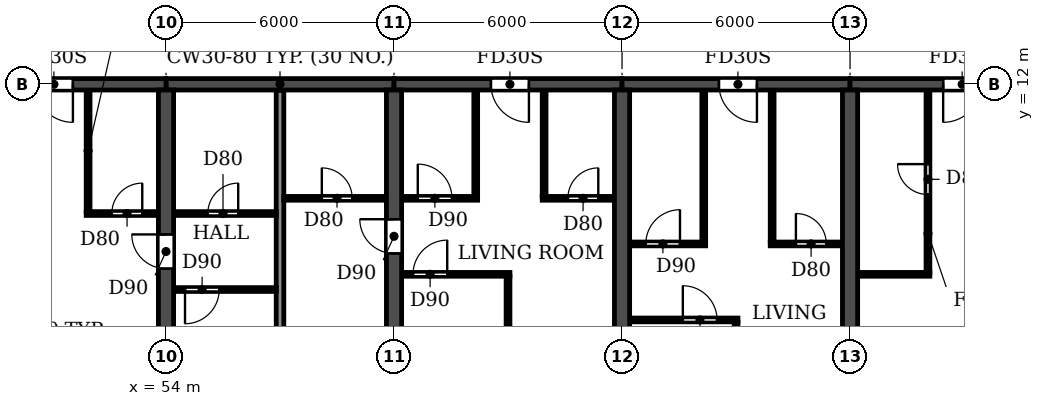
"""IFC4 building model, lengths in metres.
Left out: names, types, materials, properties, quantities, classifications, styles, units other than length and angle.
Written with IfcOpenShell. Run it as: python <this file> out.ifc"""

import sys

from ifc_helpers import new_model, si_unit, direction, frame, frame_2d, origin, place, context, subcontext, project, spatial, rectangle, extrude, element, fill, save


model = new_model("IFC4")
c1 = context("Model", 3, precision=1e-05, world=origin(), true_north=direction((0.0, 1.0)))
c2 = subcontext(c1, "Body", "Model", "MODEL_VIEW")
j1 = project(units=[si_unit("LENGTHUNIT", "METRE"), si_unit("PLANEANGLEUNIT", "RADIAN")], contexts=[c1])
p1 = place(None, origin())
s1 = spatial("IfcSite", under=j1, at=p1, CompositionType="ELEMENT")
p2 = place(p1, origin())
s2 = spatial("IfcBuilding", under=s1, at=p2, CompositionType="ELEMENT")
p3 = place(p2, frame((0.0, 0.0, 33.3)))
s3 = spatial("IfcBuildingStorey", under=s2, at=p3, CompositionType="ELEMENT", Elevation=33.3)
p4 = place(p3, frame((54.0, 0.2, 0.0), z_axis=(0.0, 0.0, 1.0), x_axis=(0.0, 1.0, 0.0)))
e1 = element("IfcWall", 1, at=p4, inside=s3, PredefinedType="SHEAR", context=c2, shape_type="SweptSolid", body=[
    extrude(rectangle(XDim=11.65, YDim=0.4, at=frame_2d((5.825, 0.0))), origin(), (0.0, 0.0, 1.0), 3.05),
])
p5 = place(p4, frame((6.95, 0.0, 0.0)))
e2 = element("IfcOpeningElement", 2, at=p5, cuts=e1, PredefinedType="OPENING", context=c2, shape_type="SweptSolid", body=[
    extrude(rectangle(XDim=0.9, YDim=2.1, at=frame_2d((0.45, 1.05))), frame((0.0, 0.21, 0.0), z_axis=(0.0, -1.0, 0.0), x_axis=(1.0, 0.0, 0.0)), (0.0, 0.0, 1.0), 0.42),
])
p6 = place(p3, frame((60.0, 0.2, 0.0), z_axis=(0.0, 0.0, 1.0), x_axis=(0.0, 1.0, 0.0)))
e3 = element("IfcWall", 3, at=p6, inside=s3, PredefinedType="SHEAR", context=c2, shape_type="SweptSolid", body=[
    extrude(rectangle(XDim=11.65, YDim=0.4, at=frame_2d((5.825, 0.0))), origin(), (0.0, 0.0, 1.0), 3.05),
])
p7 = place(p6, frame((7.35, 0.0, 0.0)))
e4 = element("IfcOpeningElement", 4, at=p7, cuts=e3, PredefinedType="OPENING", context=c2, shape_type="SweptSolid", body=[
    extrude(rectangle(XDim=0.9, YDim=2.1, at=frame_2d((0.45, 1.05))), frame((0.0, 0.21, 0.0), z_axis=(0.0, -1.0, 0.0), x_axis=(1.0, 0.0, 0.0)), (0.0, 0.0, 1.0), 0.42),
])
for number, where, z_axis, x_axis in (
    (5, (66.0, 0.2, 0.0), (0.0, 0.0, 1.0), (0.0, 1.0, 0.0)),
    (6, (72.0, 0.2, 0.0), (0.0, 0.0, 1.0), (0.0, 1.0, 0.0)),
):
    element("IfcWall", number, at=place(p3, frame(where, z_axis=z_axis, x_axis=x_axis)), inside=s3, PredefinedType="SHEAR", context=c2, shape_type="SweptSolid", body=[
        extrude(rectangle(XDim=11.65, YDim=0.4, at=frame_2d((5.825, 0.0))), origin(), (0.0, 0.0, 1.0), 3.05),
    ])
p8 = place(p3, frame((48.0, 12.0, 0.0), z_axis=(0.0, 0.0, 1.0), x_axis=(1.0, 0.0, 0.0)))
e7 = element("IfcWall", 7, at=p8, inside=s3, PredefinedType="SHEAR", context=c2, shape_type="SweptSolid", body=[
    extrude(rectangle(XDim=6.0, YDim=0.3, at=frame_2d((3.0, 0.0))), origin(), (0.0, 0.0, 1.0), 2.45),
])
p9 = place(p8, frame((2.55, 0.0, 0.0)))
e8 = element("IfcOpeningElement", 8, at=p9, cuts=e7, PredefinedType="OPENING", context=c2, shape_type="SweptSolid", body=[
    extrude(rectangle(XDim=1.0, YDim=2.1, at=frame_2d((0.5, 1.05))), frame((0.0, 0.16, 0.0), z_axis=(0.0, -1.0, 0.0), x_axis=(1.0, 0.0, 0.0)), (0.0, 0.0, 1.0), 0.32),
])
p10 = place(p3, frame((54.0, 12.0, 0.0), z_axis=(0.0, 0.0, 1.0), x_axis=(1.0, 0.0, 0.0)))
e9 = element("IfcWall", 9, at=p10, inside=s3, PredefinedType="SHEAR", context=c2, shape_type="SweptSolid", body=[
    extrude(rectangle(XDim=6.0, YDim=0.3, at=frame_2d((3.0, 0.0))), origin(), (0.0, 0.0, 1.0), 2.45),
])
p11 = place(p3, frame((60.0, 12.0, 0.0), z_axis=(0.0, 0.0, 1.0), x_axis=(1.0, 0.0, 0.0)))
e10 = element("IfcWall", 10, at=p11, inside=s3, PredefinedType="SHEAR", context=c2, shape_type="SweptSolid", body=[
    extrude(rectangle(XDim=6.0, YDim=0.3, at=frame_2d((3.0, 0.0))), origin(), (0.0, 0.0, 1.0), 2.45),
])
p12 = place(p11, frame((2.55, 0.0, 0.0)))
e11 = element("IfcOpeningElement", 11, at=p12, cuts=e10, PredefinedType="OPENING", context=c2, shape_type="SweptSolid", body=[
    extrude(rectangle(XDim=1.0, YDim=2.1, at=frame_2d((0.5, 1.05))), frame((0.0, 0.16, 0.0), z_axis=(0.0, -1.0, 0.0), x_axis=(1.0, 0.0, 0.0)), (0.0, 0.0, 1.0), 0.32),
])
p13 = place(p3, frame((66.0, 12.0, 0.0), z_axis=(0.0, 0.0, 1.0), x_axis=(1.0, 0.0, 0.0)))
e12 = element("IfcWall", 12, at=p13, inside=s3, PredefinedType="SHEAR", context=c2, shape_type="SweptSolid", body=[
    extrude(rectangle(XDim=6.0, YDim=0.3, at=frame_2d((3.0, 0.0))), origin(), (0.0, 0.0, 1.0), 2.45),
])
p14 = place(p13, frame((2.55, 0.0, 0.0)))
e13 = element("IfcOpeningElement", 13, at=p14, cuts=e12, PredefinedType="OPENING", context=c2, shape_type="SweptSolid", body=[
    extrude(rectangle(XDim=1.0, YDim=2.1, at=frame_2d((0.5, 1.05))), frame((0.0, 0.16, 0.0), z_axis=(0.0, -1.0, 0.0), x_axis=(1.0, 0.0, 0.0)), (0.0, 0.0, 1.0), 0.32),
])
p15 = place(p3, frame((72.0, 12.0, 0.0), z_axis=(0.0, 0.0, 1.0), x_axis=(1.0, 0.0, 0.0)))
e14 = element("IfcWall", 14, at=p15, inside=s3, PredefinedType="SHEAR", context=c2, shape_type="SweptSolid", body=[
    extrude(rectangle(XDim=6.0, YDim=0.3, at=frame_2d((3.0, 0.0))), origin(), (0.0, 0.0, 1.0), 2.45),
])
p16 = place(p15, frame((2.45, 0.0, 0.0)))
e15 = element("IfcOpeningElement", 15, at=p16, cuts=e14, PredefinedType="OPENING", context=c2, shape_type="SweptSolid", body=[
    extrude(rectangle(XDim=1.0, YDim=2.1, at=frame_2d((0.5, 1.05))), frame((0.0, 0.16, 0.0), z_axis=(0.0, -1.0, 0.0), x_axis=(1.0, 0.0, 0.0)), (0.0, 0.0, 1.0), 0.32),
])
p17 = place(p3, frame((57.0, 0.06, 0.0), z_axis=(0.0, 0.0, 1.0), x_axis=(0.0, 1.0, 0.0)))
e16 = element("IfcWall", 16, at=p17, inside=s3, PredefinedType="PARTITIONING", context=c2, shape_type="SweptSolid", body=[
    extrude(rectangle(XDim=11.78, YDim=0.2, at=frame_2d((5.89, 0.0))), origin(), (0.0, 0.0, 1.0), 3.05),
])
p18 = place(p3, frame((66.21, 5.8, 0.0), z_axis=(0.0, 0.0, 1.0), x_axis=(1.0, 0.0, 0.0)))
e17 = element("IfcWall", 17, at=p18, inside=s3, PredefinedType="PARTITIONING", context=c2, shape_type="SweptSolid", body=[
    extrude(rectangle(XDim=2.84, YDim=0.1, at=frame_2d((1.42, 0.0))), origin(), (0.0, 0.0, 1.0), 3.05),
])
p19 = place(p18, frame((1.39, 0.0, 0.0)))
e18 = element("IfcOpeningElement", 18, at=p19, cuts=e17, PredefinedType="OPENING", context=c2, shape_type="SweptSolid", body=[
    extrude(rectangle(XDim=0.9, YDim=2.1, at=frame_2d((0.45, 1.05))), frame((0.0, 0.06, 0.0), z_axis=(0.0, -1.0, 0.0), x_axis=(1.0, 0.0, 0.0)), (0.0, 0.0, 1.0), 0.12),
])
p20 = place(p3, frame((54.21, 6.6, 0.0), z_axis=(0.0, 0.0, 1.0), x_axis=(1.0, 0.0, 0.0)))
e19 = element("IfcWall", 19, at=p20, inside=s3, PredefinedType="PARTITIONING", context=c2, shape_type="SweptSolid", body=[
    extrude(rectangle(XDim=2.69, YDim=0.1, at=frame_2d((1.345, 0.0))), origin(), (0.0, 0.0, 1.0), 3.05),
])
p21 = place(p20, frame((0.29, 0.0, 0.0)))
e20 = element("IfcOpeningElement", 20, at=p21, cuts=e19, PredefinedType="OPENING", context=c2, shape_type="SweptSolid", body=[
    extrude(rectangle(XDim=0.9, YDim=2.1, at=frame_2d((0.45, 1.05))), frame((0.0, 0.06, 0.0), z_axis=(0.0, -1.0, 0.0), x_axis=(1.0, 0.0, 0.0)), (0.0, 0.0, 1.0), 0.12),
])
p22 = place(p3, frame((60.21, 7.0, 0.0), z_axis=(0.0, 0.0, 1.0), x_axis=(1.0, 0.0, 0.0)))
e21 = element("IfcWall", 21, at=p22, inside=s3, PredefinedType="PARTITIONING", context=c2, shape_type="SweptSolid", body=[
    extrude(rectangle(XDim=2.84, YDim=0.1, at=frame_2d((1.42, 0.0))), origin(), (0.0, 0.0, 1.0), 3.05),
])
p23 = place(p22, frame((0.29, 0.0, 0.0)))
e22 = element("IfcOpeningElement", 22, at=p23, cuts=e21, PredefinedType="OPENING", context=c2, shape_type="SweptSolid", body=[
    extrude(rectangle(XDim=0.9, YDim=2.1, at=frame_2d((0.45, 1.05))), frame((0.0, 0.06, 0.0), z_axis=(0.0, -1.0, 0.0), x_axis=(1.0, 0.0, 0.0)), (0.0, 0.0, 1.0), 0.12),
])
p24 = place(p3, frame((72.21, 7.0, 0.0), z_axis=(0.0, 0.0, 1.0), x_axis=(1.0, 0.0, 0.0)))
e23 = element("IfcWall", 23, at=p24, inside=s3, PredefinedType="PARTITIONING", context=c2, shape_type="SweptSolid", body=[
    extrude(rectangle(XDim=1.89, YDim=0.1, at=frame_2d((0.945, 0.0))), origin(), (0.0, 0.0, 1.0), 3.05),
])
p25 = place(p3, frame((66.21, 7.8, 0.0), z_axis=(0.0, 0.0, 1.0), x_axis=(1.0, 0.0, 0.0)))
e24 = element("IfcWall", 24, at=p25, inside=s3, PredefinedType="PARTITIONING", context=c2, shape_type="SweptSolid", body=[
    extrude(rectangle(XDim=1.99, YDim=0.1, at=frame_2d((0.995, 0.0))), origin(), (0.0, 0.0, 1.0), 3.05),
])
p26 = place(p25, frame((0.415, 0.0, 0.0)))
e25 = element("IfcOpeningElement", 25, at=p26, cuts=e24, PredefinedType="OPENING", context=c2, shape_type="SweptSolid", body=[
    extrude(rectangle(XDim=0.9, YDim=2.1, at=frame_2d((0.45, 1.05))), frame((0.0, 0.06, 0.0), z_axis=(0.0, -1.0, 0.0), x_axis=(1.0, 0.0, 0.0)), (0.0, 0.0, 1.0), 0.12),
])
p27 = place(p3, frame((69.9, 7.8, 0.0), z_axis=(0.0, 0.0, 1.0), x_axis=(1.0, 0.0, 0.0)))
e26 = element("IfcWall", 26, at=p27, inside=s3, PredefinedType="PARTITIONING", context=c2, shape_type="SweptSolid", body=[
    extrude(rectangle(XDim=1.89, YDim=0.1, at=frame_2d((0.945, 0.0))), origin(), (0.0, 0.0, 1.0), 3.05),
])
p28 = place(p27, frame((0.675, 0.0, 0.0)))
e27 = element("IfcOpeningElement", 27, at=p28, cuts=e26, PredefinedType="OPENING", context=c2, shape_type="SweptSolid", body=[
    extrude(rectangle(XDim=0.8, YDim=2.1, at=frame_2d((0.4, 1.05))), frame((0.0, 0.06, 0.0), z_axis=(0.0, -1.0, 0.0), x_axis=(1.0, 0.0, 0.0)), (0.0, 0.0, 1.0), 0.12),
])
p29 = place(p3, frame((51.9, 8.6, 0.0), z_axis=(0.0, 0.0, 1.0), x_axis=(1.0, 0.0, 0.0)))
e28 = element("IfcWall", 28, at=p29, inside=s3, PredefinedType="PARTITIONING", context=c2, shape_type="SweptSolid", body=[
    extrude(rectangle(XDim=1.89, YDim=0.1, at=frame_2d((0.945, 0.0))), origin(), (0.0, 0.0, 1.0), 3.05),
])
p30 = place(p29, frame((0.675, 0.0, 0.0)))
e29 = element("IfcOpeningElement", 29, at=p30, cuts=e28, PredefinedType="OPENING", context=c2, shape_type="SweptSolid", body=[
    extrude(rectangle(XDim=0.8, YDim=2.1, at=frame_2d((0.4, 1.05))), frame((0.0, 0.06, 0.0), z_axis=(0.0, -1.0, 0.0), x_axis=(1.0, 0.0, 0.0)), (0.0, 0.0, 1.0), 0.12),
])
p31 = place(p3, frame((54.21, 8.6, 0.0), z_axis=(0.0, 0.0, 1.0), x_axis=(1.0, 0.0, 0.0)))
e30 = element("IfcWall", 30, at=p31, inside=s3, PredefinedType="PARTITIONING", context=c2, shape_type="SweptSolid", body=[
    extrude(rectangle(XDim=2.69, YDim=0.1, at=frame_2d((1.345, 0.0))), origin(), (0.0, 0.0, 1.0), 3.05),
])
p32 = place(p31, frame((0.89, 0.0, 0.0)))
e31 = element("IfcOpeningElement", 31, at=p32, cuts=e30, PredefinedType="OPENING", context=c2, shape_type="SweptSolid", body=[
    extrude(rectangle(XDim=0.8, YDim=2.1, at=frame_2d((0.4, 1.05))), frame((0.0, 0.06, 0.0), z_axis=(0.0, -1.0, 0.0), x_axis=(1.0, 0.0, 0.0)), (0.0, 0.0, 1.0), 0.12),
])
p33 = place(p3, frame((57.1, 9.0, 0.0), z_axis=(0.0, 0.0, 1.0), x_axis=(1.0, 0.0, 0.0)))
e32 = element("IfcWall", 32, at=p33, inside=s3, PredefinedType="PARTITIONING", context=c2, shape_type="SweptSolid", body=[
    extrude(rectangle(XDim=2.69, YDim=0.1, at=frame_2d((1.345, 0.0))), origin(), (0.0, 0.0, 1.0), 3.05),
])
p34 = place(p33, frame((1.0, 0.0, 0.0)))
e33 = element("IfcOpeningElement", 33, at=p34, cuts=e32, PredefinedType="OPENING", context=c2, shape_type="SweptSolid", body=[
    extrude(rectangle(XDim=0.8, YDim=2.1, at=frame_2d((0.4, 1.05))), frame((0.0, 0.06, 0.0), z_axis=(0.0, -1.0, 0.0), x_axis=(1.0, 0.0, 0.0)), (0.0, 0.0, 1.0), 0.12),
])
p35 = place(p3, frame((60.21, 9.0, 0.0), z_axis=(0.0, 0.0, 1.0), x_axis=(1.0, 0.0, 0.0)))
e34 = element("IfcWall", 34, at=p35, inside=s3, PredefinedType="PARTITIONING", context=c2, shape_type="SweptSolid", body=[
    extrude(rectangle(XDim=1.99, YDim=0.1, at=frame_2d((0.995, 0.0))), origin(), (0.0, 0.0, 1.0), 3.05),
])
p36 = place(p35, frame((0.415, 0.0, 0.0)))
e35 = element("IfcOpeningElement", 35, at=p36, cuts=e34, PredefinedType="OPENING", context=c2, shape_type="SweptSolid", body=[
    extrude(rectangle(XDim=0.9, YDim=2.1, at=frame_2d((0.45, 1.05))), frame((0.0, 0.06, 0.0), z_axis=(0.0, -1.0, 0.0), x_axis=(1.0, 0.0, 0.0)), (0.0, 0.0, 1.0), 0.12),
])
p37 = place(p3, frame((63.9, 9.0, 0.0), z_axis=(0.0, 0.0, 1.0), x_axis=(1.0, 0.0, 0.0)))
e36 = element("IfcWall", 36, at=p37, inside=s3, PredefinedType="PARTITIONING", context=c2, shape_type="SweptSolid", body=[
    extrude(rectangle(XDim=1.89, YDim=0.1, at=frame_2d((0.945, 0.0))), origin(), (0.0, 0.0, 1.0), 3.05),
])
p38 = place(p37, frame((0.675, 0.0, 0.0)))
e37 = element("IfcOpeningElement", 37, at=p38, cuts=e36, PredefinedType="OPENING", context=c2, shape_type="SweptSolid", body=[
    extrude(rectangle(XDim=0.8, YDim=2.1, at=frame_2d((0.4, 1.05))), frame((0.0, 0.06, 0.0), z_axis=(0.0, -1.0, 0.0), x_axis=(1.0, 0.0, 0.0)), (0.0, 0.0, 1.0), 0.12),
])
p39 = place(p3, frame((51.95, 8.65, 0.0), z_axis=(0.0, 0.0, 1.0), x_axis=(0.0, 1.0, 0.0)))
e38 = element("IfcWall", 38, at=p39, inside=s3, PredefinedType="PARTITIONING", context=c2, shape_type="SweptSolid", body=[
    extrude(rectangle(XDim=3.19, YDim=0.1, at=frame_2d((1.595, 0.0))), origin(), (0.0, 0.0, 1.0), 3.05),
])
p40 = place(p3, frame((62.15, 9.05, 0.0), z_axis=(0.0, 0.0, 1.0), x_axis=(0.0, 1.0, 0.0)))
e39 = element("IfcWall", 39, at=p40, inside=s3, PredefinedType="PARTITIONING", context=c2, shape_type="SweptSolid", body=[
    extrude(rectangle(XDim=2.79, YDim=0.1, at=frame_2d((1.395, 0.0))), origin(), (0.0, 0.0, 1.0), 3.05),
])
p41 = place(p3, frame((63.0, 0.06, 0.0), z_axis=(0.0, 0.0, 1.0), x_axis=(0.0, 1.0, 0.0)))
e40 = element("IfcWall", 40, at=p41, inside=s3, PredefinedType="PARTITIONING", context=c2, shape_type="SweptSolid", body=[
    extrude(rectangle(XDim=6.89, YDim=0.1, at=frame_2d((3.445, 0.0))), origin(), (0.0, 0.0, 1.0), 3.05),
])
p42 = place(p3, frame((63.95, 9.05, 0.0), z_axis=(0.0, 0.0, 1.0), x_axis=(0.0, 1.0, 0.0)))
e41 = element("IfcWall", 41, at=p42, inside=s3, PredefinedType="PARTITIONING", context=c2, shape_type="SweptSolid", body=[
    extrude(rectangle(XDim=2.79, YDim=0.1, at=frame_2d((1.395, 0.0))), origin(), (0.0, 0.0, 1.0), 3.05),
])
p43 = place(p3, frame((68.15, 7.85, 0.0), z_axis=(0.0, 0.0, 1.0), x_axis=(0.0, 1.0, 0.0)))
e42 = element("IfcWall", 42, at=p43, inside=s3, PredefinedType="PARTITIONING", context=c2, shape_type="SweptSolid", body=[
    extrude(rectangle(XDim=3.99, YDim=0.1, at=frame_2d((1.995, 0.0))), origin(), (0.0, 0.0, 1.0), 3.05),
])
p44 = place(p3, frame((69.0, 0.06, 0.0), z_axis=(0.0, 0.0, 1.0), x_axis=(0.0, 1.0, 0.0)))
e43 = element("IfcWall", 43, at=p44, inside=s3, PredefinedType="PARTITIONING", context=c2, shape_type="SweptSolid", body=[
    extrude(rectangle(XDim=5.69, YDim=0.1, at=frame_2d((2.845, 0.0))), origin(), (0.0, 0.0, 1.0), 3.05),
])
p45 = place(p3, frame((69.95, 7.85, 0.0), z_axis=(0.0, 0.0, 1.0), x_axis=(0.0, 1.0, 0.0)))
e44 = element("IfcWall", 44, at=p45, inside=s3, PredefinedType="PARTITIONING", context=c2, shape_type="SweptSolid", body=[
    extrude(rectangle(XDim=3.99, YDim=0.1, at=frame_2d((1.995, 0.0))), origin(), (0.0, 0.0, 1.0), 3.05),
])
p46 = place(p3, frame((74.05, 7.05, 0.0), z_axis=(0.0, 0.0, 1.0), x_axis=(0.0, 1.0, 0.0)))
e45 = element("IfcWall", 45, at=p46, inside=s3, PredefinedType="PARTITIONING", context=c2, shape_type="SweptSolid", body=[
    extrude(rectangle(XDim=4.79, YDim=0.1, at=frame_2d((2.395, 0.0))), origin(), (0.0, 0.0, 1.0), 3.05),
])
p47 = place(p46, frame((2.05, 0.0, 0.0)))
e46 = element("IfcOpeningElement", 46, at=p47, cuts=e45, PredefinedType="OPENING", context=c2, shape_type="SweptSolid", body=[
    extrude(rectangle(XDim=0.8, YDim=2.1, at=frame_2d((0.4, 1.05))), frame((0.0, 0.06, 0.0), z_axis=(0.0, -1.0, 0.0), x_axis=(1.0, 0.0, 0.0)), (0.0, 0.0, 1.0), 0.12),
])
p48 = place(p21, frame((0.9, 0.0, 0.0), z_axis=(0.0, 0.0, 1.0), x_axis=(-1.0, 0.0, 0.0)))
e47 = element("IfcDoor", 47, at=p48, inside=s3, OperationType="SINGLE_SWING_RIGHT", PredefinedType="DOOR", context=c2, shape_type="SweptSolid", body=[
    extrude(rectangle(XDim=0.9, YDim=2.1, at=frame_2d((0.45, 1.05))), frame((0.0, 0.025, 0.0), z_axis=(0.0, -1.0, 0.0), x_axis=(1.0, 0.0, 0.0)), (0.0, 0.0, 1.0), 0.05),
])
fill(e20, e47)
p49 = place(p32, origin())
e48 = element("IfcDoor", 48, at=p49, inside=s3, OperationType="SINGLE_SWING_RIGHT", PredefinedType="DOOR", context=c2, shape_type="SweptSolid", body=[
    extrude(rectangle(XDim=0.8, YDim=2.1, at=frame_2d((0.4, 1.05))), frame((0.0, 0.025, 0.0), z_axis=(0.0, -1.0, 0.0), x_axis=(1.0, 0.0, 0.0)), (0.0, 0.0, 1.0), 0.05),
])
fill(e31, e48)
p50 = place(p9, frame((1.0, 0.0, 0.0), z_axis=(0.0, 0.0, 1.0), x_axis=(-1.0, 0.0, 0.0)))
e49 = element("IfcDoor", 49, at=p50, inside=s3, OperationType="SINGLE_SWING_LEFT", PredefinedType="DOOR", context=c2, shape_type="SweptSolid", body=[
    extrude(rectangle(XDim=1.0, YDim=2.1, at=frame_2d((0.5, 1.05))), frame((0.0, 0.025, 0.0), z_axis=(0.0, -1.0, 0.0), x_axis=(1.0, 0.0, 0.0)), (0.0, 0.0, 1.0), 0.05),
])
fill(e8, e49)
p51 = place(p30, origin())
e50 = element("IfcDoor", 50, at=p51, inside=s3, OperationType="SINGLE_SWING_RIGHT", PredefinedType="DOOR", context=c2, shape_type="SweptSolid", body=[
    extrude(rectangle(XDim=0.8, YDim=2.1, at=frame_2d((0.4, 1.05))), frame((0.0, 0.025, 0.0), z_axis=(0.0, -1.0, 0.0), x_axis=(1.0, 0.0, 0.0)), (0.0, 0.0, 1.0), 0.05),
])
fill(e29, e50)
p52 = place(p5, origin())
e51 = element("IfcDoor", 51, at=p52, inside=s3, OperationType="SINGLE_SWING_RIGHT", PredefinedType="DOOR", context=c2, shape_type="SweptSolid", body=[
    extrude(rectangle(XDim=0.9, YDim=2.1, at=frame_2d((0.45, 1.05))), frame((0.0, 0.025, 0.0), z_axis=(0.0, -1.0, 0.0), x_axis=(1.0, 0.0, 0.0)), (0.0, 0.0, 1.0), 0.05),
])
fill(e2, e51)
p53 = place(p34, origin())
e52 = element("IfcDoor", 52, at=p53, inside=s3, OperationType="SINGLE_SWING_LEFT", PredefinedType="DOOR", context=c2, shape_type="SweptSolid", body=[
    extrude(rectangle(XDim=0.8, YDim=2.1, at=frame_2d((0.4, 1.05))), frame((0.0, 0.025, 0.0), z_axis=(0.0, -1.0, 0.0), x_axis=(1.0, 0.0, 0.0)), (0.0, 0.0, 1.0), 0.05),
])
fill(e33, e52)
p54 = place(p7, origin())
e53 = element("IfcDoor", 53, at=p54, inside=s3, OperationType="SINGLE_SWING_RIGHT", PredefinedType="DOOR", context=c2, shape_type="SweptSolid", body=[
    extrude(rectangle(XDim=0.9, YDim=2.1, at=frame_2d((0.45, 1.05))), frame((0.0, 0.025, 0.0), z_axis=(0.0, -1.0, 0.0), x_axis=(1.0, 0.0, 0.0)), (0.0, 0.0, 1.0), 0.05),
])
fill(e4, e53)
p55 = place(p23, origin())
e54 = element("IfcDoor", 54, at=p55, inside=s3, OperationType="SINGLE_SWING_RIGHT", PredefinedType="DOOR", context=c2, shape_type="SweptSolid", body=[
    extrude(rectangle(XDim=0.9, YDim=2.1, at=frame_2d((0.45, 1.05))), frame((0.0, 0.025, 0.0), z_axis=(0.0, -1.0, 0.0), x_axis=(1.0, 0.0, 0.0)), (0.0, 0.0, 1.0), 0.05),
])
fill(e22, e54)
p56 = place(p36, origin())
e55 = element("IfcDoor", 55, at=p56, inside=s3, OperationType="SINGLE_SWING_LEFT", PredefinedType="DOOR", context=c2, shape_type="SweptSolid", body=[
    extrude(rectangle(XDim=0.9, YDim=2.1, at=frame_2d((0.45, 1.05))), frame((0.0, 0.025, 0.0), z_axis=(0.0, -1.0, 0.0), x_axis=(1.0, 0.0, 0.0)), (0.0, 0.0, 1.0), 0.05),
])
fill(e35, e55)
p57 = place(p12, frame((1.0, 0.0, 0.0), z_axis=(0.0, 0.0, 1.0), x_axis=(-1.0, 0.0, 0.0)))
e56 = element("IfcDoor", 56, at=p57, inside=s3, OperationType="SINGLE_SWING_LEFT", PredefinedType="DOOR", context=c2, shape_type="SweptSolid", body=[
    extrude(rectangle(XDim=1.0, YDim=2.1, at=frame_2d((0.5, 1.05))), frame((0.0, 0.025, 0.0), z_axis=(0.0, -1.0, 0.0), x_axis=(1.0, 0.0, 0.0)), (0.0, 0.0, 1.0), 0.05),
])
fill(e11, e56)
p58 = place(p38, origin())
e57 = element("IfcDoor", 57, at=p58, inside=s3, OperationType="SINGLE_SWING_RIGHT", PredefinedType="DOOR", context=c2, shape_type="SweptSolid", body=[
    extrude(rectangle(XDim=0.8, YDim=2.1, at=frame_2d((0.4, 1.05))), frame((0.0, 0.025, 0.0), z_axis=(0.0, -1.0, 0.0), x_axis=(1.0, 0.0, 0.0)), (0.0, 0.0, 1.0), 0.05),
])
fill(e37, e57)
p59 = place(p26, origin())
e58 = element("IfcDoor", 58, at=p59, inside=s3, OperationType="SINGLE_SWING_RIGHT", PredefinedType="DOOR", context=c2, shape_type="SweptSolid", body=[
    extrude(rectangle(XDim=0.9, YDim=2.1, at=frame_2d((0.45, 1.05))), frame((0.0, 0.025, 0.0), z_axis=(0.0, -1.0, 0.0), x_axis=(1.0, 0.0, 0.0)), (0.0, 0.0, 1.0), 0.05),
])
fill(e25, e58)
p60 = place(p19, origin())
e59 = element("IfcDoor", 59, at=p60, inside=s3, OperationType="SINGLE_SWING_LEFT", PredefinedType="DOOR", context=c2, shape_type="SweptSolid", body=[
    extrude(rectangle(XDim=0.9, YDim=2.1, at=frame_2d((0.45, 1.05))), frame((0.0, 0.025, 0.0), z_axis=(0.0, -1.0, 0.0), x_axis=(1.0, 0.0, 0.0)), (0.0, 0.0, 1.0), 0.05),
])
fill(e18, e59)
p61 = place(p14, frame((1.0, 0.0, 0.0), z_axis=(0.0, 0.0, 1.0), x_axis=(-1.0, 0.0, 0.0)))
e60 = element("IfcDoor", 60, at=p61, inside=s3, OperationType="SINGLE_SWING_LEFT", PredefinedType="DOOR", context=c2, shape_type="SweptSolid", body=[
    extrude(rectangle(XDim=1.0, YDim=2.1, at=frame_2d((0.5, 1.05))), frame((0.0, 0.025, 0.0), z_axis=(0.0, -1.0, 0.0), x_axis=(1.0, 0.0, 0.0)), (0.0, 0.0, 1.0), 0.05),
])
fill(e13, e60)
p62 = place(p28, origin())
e61 = element("IfcDoor", 61, at=p62, inside=s3, OperationType="SINGLE_SWING_LEFT", PredefinedType="DOOR", context=c2, shape_type="SweptSolid", body=[
    extrude(rectangle(XDim=0.8, YDim=2.1, at=frame_2d((0.4, 1.05))), frame((0.0, 0.025, 0.0), z_axis=(0.0, -1.0, 0.0), x_axis=(1.0, 0.0, 0.0)), (0.0, 0.0, 1.0), 0.05),
])
fill(e27, e61)
p63 = place(p47, origin())
e62 = element("IfcDoor", 62, at=p63, inside=s3, OperationType="SINGLE_SWING_RIGHT", PredefinedType="DOOR", context=c2, shape_type="SweptSolid", body=[
    extrude(rectangle(XDim=0.8, YDim=2.1, at=frame_2d((0.4, 1.05))), frame((0.0, 0.025, 0.0), z_axis=(0.0, -1.0, 0.0), x_axis=(1.0, 0.0, 0.0)), (0.0, 0.0, 1.0), 0.05),
])
fill(e46, e62)
p64 = place(p16, frame((1.0, 0.0, 0.0), z_axis=(0.0, 0.0, 1.0), x_axis=(-1.0, 0.0, 0.0)))
e63 = element("IfcDoor", 63, at=p64, inside=s3, OperationType="SINGLE_SWING_RIGHT", PredefinedType="DOOR", context=c2, shape_type="SweptSolid", body=[
    extrude(rectangle(XDim=1.0, YDim=2.1, at=frame_2d((0.5, 1.05))), frame((0.0, 0.025, 0.0), z_axis=(0.0, -1.0, 0.0), x_axis=(1.0, 0.0, 0.0)), (0.0, 0.0, 1.0), 0.05),
])
fill(e15, e63)
save(model, sys.argv[1])
